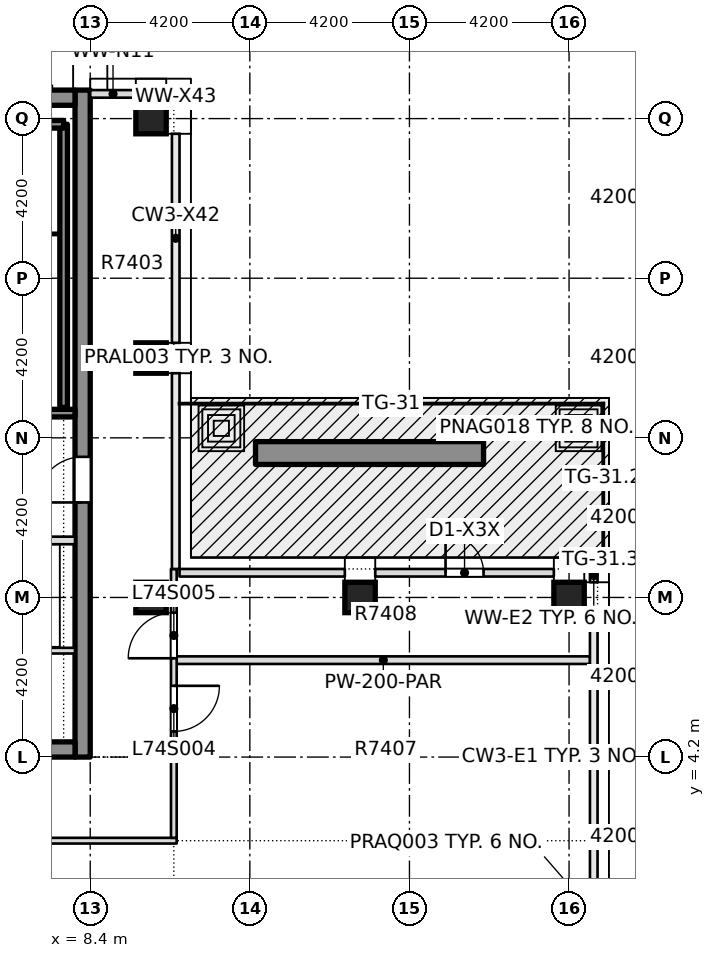
"""IFC4 building model, lengths in metres.
Left out: names, types, materials, properties, quantities, classifications, styles, units other than length and angle.
Written with IfcOpenShell. Run it as: python <this file> out.ifc"""

import sys

from ifc_helpers import new_model, si_unit, direction, frame, frame_2d, origin, origin_2d, place, context, subcontext, project, spatial, rectangle, extrude, element, fill, save


model = new_model("IFC4")
c1 = context("Model", 3, precision=1e-05, world=origin(), true_north=direction((0.0, 1.0)))
c2 = subcontext(c1, "Body", "Model", "MODEL_VIEW")
j1 = project(units=[si_unit("LENGTHUNIT", "METRE"), si_unit("PLANEANGLEUNIT", "RADIAN")], contexts=[c1])
p1 = place(None, origin())
s1 = spatial("IfcSite", under=j1, at=p1, CompositionType="ELEMENT")
p2 = place(p1, origin())
s2 = spatial("IfcBuilding", under=s1, at=p2, CompositionType="ELEMENT")
p3 = place(p2, frame((0.0, 0.0, 284.85)))
s3 = spatial("IfcBuildingStorey", under=s2, at=p3, CompositionType="ELEMENT", Elevation=284.85)
p4 = place(p3, frame((8.2, 4.2, -0.5), z_axis=(0.0, 0.0, 1.0), x_axis=(0.0, 1.0, 0.0)))
e1 = element("IfcWall", 1, at=p4, inside=s3, PredefinedType="SHEAR", context=c2, shape_type="SweptSolid", body=[
    extrude(rectangle(XDim=17.55, YDim=0.4, at=frame_2d((8.775, 0.0))), origin(), (0.0, 0.0, 1.0), 4.5),
])
p5 = place(p4, frame((6.7, 0.0, 0.5)))
e2 = element("IfcOpeningElement", 2, at=p5, cuts=e1, PredefinedType="OPENING", context=c2, shape_type="SweptSolid", body=[
    extrude(rectangle(XDim=1.2, YDim=2.1, at=frame_2d((0.6, 1.05))), frame((0.0, 0.21, 0.0), z_axis=(0.0, -1.0, 0.0), x_axis=(1.0, 0.0, 0.0)), (0.0, 0.0, 1.0), 0.42),
])
for number, where, z_axis, x_axis in (
    (3, (-8.0, 4.4, -0.5), (0.0, 0.0, 1.0), (1.0, 0.0, 0.0)),
    (4, (-8.0, 21.55, -0.5), (0.0, 0.0, 1.0), (1.0, 0.0, 0.0)),
):
    element("IfcWall", number, at=place(p3, frame(where, z_axis=z_axis, x_axis=x_axis)), inside=s3, PredefinedType="SHEAR", context=c2, shape_type="SweptSolid", body=[
        extrude(rectangle(XDim=16.0, YDim=0.4, at=frame_2d((8.0, 0.0))), origin(), (0.0, 0.0, 1.0), 4.5),
    ])
for number, where, z_axis, x_axis in (
    (5, (10.0, 8.4, -0.5), (0.0, 0.0, 1.0), (1.0, 0.0, 0.0)),
    (6, (15.5, 8.4, -0.5), (0.0, 0.0, 1.0), (1.0, 0.0, 0.0)),
    (7, (21.0, 8.4, -0.5), (0.0, 0.0, 1.0), (1.0, 0.0, 0.0)),
    (8, (10.0, 14.7, -0.5), (0.0, 0.0, 1.0), (1.0, 0.0, 0.0)),
    (9, (10.0, 21.0, -0.5), (0.0, 0.0, 1.0), (1.0, 0.0, 0.0)),
):
    element("IfcColumn", number, at=place(p3, frame(where, z_axis=z_axis, x_axis=x_axis)), inside=s3, PredefinedType="COLUMN", context=c2, shape_type="SweptSolid", body=[
        extrude(rectangle(XDim=0.8, YDim=0.8, at=origin_2d()), origin(), (0.0, 0.0, 1.0), 4.5),
    ])
p6 = place(p3, frame((-10.675, 2.0, 0.0), z_axis=(0.0, 0.0, 1.0), x_axis=(1.0, 0.0, 0.0)))
e10 = element("IfcWall", 10, at=p6, inside=s3, PredefinedType="PARTITIONING", context=c2, shape_type="SweptSolid", body=[
    extrude(rectangle(XDim=21.35, YDim=0.15, at=frame_2d((10.675, 0.0))), origin(), (0.0, 0.0, 1.0), 4.0),
])
p7 = place(p6, frame((9.925, 0.0, 0.0)))
e11 = element("IfcOpeningElement", 11, at=p7, cuts=e10, PredefinedType="OPENING", context=c2, shape_type="SweptSolid", body=[
    extrude(rectangle(XDim=1.5, YDim=2.1, at=frame_2d((0.75, 1.05))), frame((0.0, 0.085, 0.0), z_axis=(0.0, -1.0, 0.0), x_axis=(1.0, 0.0, 0.0)), (0.0, 0.0, 1.0), 0.17),
])
p8 = place(p3, frame((10.675, 6.75, 0.0), z_axis=(0.0, 0.0, 1.0), x_axis=(1.0, 0.0, 0.0)))
e12 = element("IfcWall", 12, at=p8, inside=s3, PredefinedType="PARTITIONING", context=c2, shape_type="SweptSolid", body=[
    extrude(rectangle(XDim=10.875, YDim=0.2, at=frame_2d((5.438, 0.0))), origin(), (0.0, 0.0, 1.0), 4.0),
])
p9 = place(p3, frame((10.6, 2.075, 0.0), z_axis=(0.0, 0.0, 1.0), x_axis=(0.0, 1.0, 0.0)))
e13 = element("IfcWall", 13, at=p9, inside=s3, PredefinedType="PARTITIONING", context=c2, shape_type="SweptSolid", body=[
    extrude(rectangle(XDim=7.075, YDim=0.15, at=frame_2d((3.538, 0.0))), origin(), (0.0, 0.0, 1.0), 4.0),
])
p10 = place(p9, frame((2.8, 0.0, 0.0)))
e14 = element("IfcOpeningElement", 14, at=p10, cuts=e13, PredefinedType="OPENING", context=c2, shape_type="SweptSolid", body=[
    extrude(rectangle(XDim=1.2, YDim=2.1, at=frame_2d((0.6, 1.05))), frame((0.0, 0.085, 0.0), z_axis=(0.0, -1.0, 0.0), x_axis=(1.0, 0.0, 0.0)), (0.0, 0.0, 1.0), 0.17),
])
p11 = place(p9, frame((4.725, 0.0, 0.0)))
e15 = element("IfcOpeningElement", 15, at=p11, cuts=e13, PredefinedType="OPENING", context=c2, shape_type="SweptSolid", body=[
    extrude(rectangle(XDim=1.2, YDim=2.1, at=frame_2d((0.6, 1.05))), frame((0.0, 0.085, 0.0), z_axis=(0.0, -1.0, 0.0), x_axis=(1.0, 0.0, 0.0)), (0.0, 0.0, 1.0), 0.17),
])
p12 = place(p3, frame((12.75, 12.2, 0.0), z_axis=(0.0, 0.0, 1.0), x_axis=(1.0, 0.0, 0.0)))
e16 = element("IfcWall", 16, at=p12, inside=s3, PredefinedType="USERDEFINED", context=c2, shape_type="SweptSolid", body=[
    extrude(rectangle(XDim=6.0, YDim=0.6, at=frame_2d((3.0, 0.0))), origin(), (0.0, 0.0, 1.0), 1.0),
])
p13 = place(p3, frame((21.65, 8.8, 0.0), z_axis=(0.0, 0.0, 1.0), x_axis=(0.0, 1.0, 0.0)))
e17 = element("IfcWall", 17, at=p13, inside=s3, PredefinedType="STANDARD", context=c2, shape_type="SweptSolid", body=[
    extrude(rectangle(XDim=0.35, YDim=0.2, at=frame_2d((0.175, 0.0))), origin(), (0.0, 0.0, 1.0), 4.0),
])
p14 = place(p3, frame((20.6, 9.05, 0.0), z_axis=(0.0, 0.0, 1.0), x_axis=(-1.0, 0.0, 0.0)))
e18 = element("IfcWall", 18, at=p14, inside=s3, PredefinedType="STANDARD", context=c2, shape_type="SweptSolid", body=[
    extrude(rectangle(XDim=4.7, YDim=0.2, at=frame_2d((2.35, 0.0))), origin(), (0.0, 0.0, 1.0), 4.0),
])
p15 = place(p14, frame((1.85, 0.0, 0.0)))
e19 = element("IfcOpeningElement", 19, at=p15, cuts=e18, PredefinedType="OPENING", context=c2, shape_type="SweptSolid", body=[
    extrude(rectangle(XDim=1.0, YDim=2.4, at=frame_2d((0.5, 1.2))), frame((0.0, 0.11, 0.0), z_axis=(0.0, -1.0, 0.0), x_axis=(1.0, 0.0, 0.0)), (0.0, 0.0, 1.0), 0.22),
])
p16 = place(p3, frame((15.1, 9.05, 0.0), z_axis=(0.0, 0.0, 1.0), x_axis=(-1.0, 0.0, 0.0)))
e20 = element("IfcWall", 20, at=p16, inside=s3, PredefinedType="STANDARD", context=c2, shape_type="SweptSolid", body=[
    extrude(rectangle(XDim=4.35, YDim=0.2, at=frame_2d((2.175, 0.0))), origin(), (0.0, 0.0, 1.0), 4.0),
])
p17 = place(p3, frame((10.65, 21.4, 0.0), z_axis=(0.0, 0.0, 1.0), x_axis=(0.0, 1.0, 0.0)))
e21 = element("IfcWall", 21, at=p17, inside=s3, PredefinedType="STANDARD", context=c2, shape_type="SweptSolid", body=[
    extrude(rectangle(XDim=0.35, YDim=0.2, at=frame_2d((0.175, 0.0))), origin(), (0.0, 0.0, 1.0), 4.0),
])
p18 = place(p3, frame((9.6, 21.65, 0.0), z_axis=(0.0, 0.0, 1.0), x_axis=(-1.0, 0.0, 0.0)))
e22 = element("IfcWall", 22, at=p18, inside=s3, PredefinedType="STANDARD", context=c2, shape_type="SweptSolid", body=[
    extrude(rectangle(XDim=1.2, YDim=0.2, at=frame_2d((0.6, 0.0))), origin(), (0.0, 0.0, 1.0), 4.0),
])
p19 = place(p3, frame((-7.999, 7.0, 0.0), z_axis=(0.0, 0.0, 1.0), x_axis=(1.0, 0.0, 0.0)))
e23 = element("IfcWall", 23, at=p19, inside=s3, PredefinedType="PARTITIONING", context=c2, shape_type="SweptSolid", body=[
    extrude(rectangle(XDim=15.998, YDim=0.15, at=frame_2d((7.999, 0.0))), origin(), (0.0, 0.0, 1.0), 4.0),
])
p20 = place(p19, frame((7.299, 0.0, 0.0)))
e24 = element("IfcOpeningElement", 24, at=p20, cuts=e23, PredefinedType="OPENING", context=c2, shape_type="SweptSolid", body=[
    extrude(rectangle(XDim=1.4, YDim=2.1, at=frame_2d((0.7, 1.05))), frame((0.0, 0.085, 0.0), z_axis=(0.0, -1.0, 0.0), x_axis=(1.0, 0.0, 0.0)), (0.0, 0.0, 1.0), 0.17),
])
p21 = place(p3, frame((3.6, 9.9, 0.0), z_axis=(0.0, 0.0, 1.0), x_axis=(1.0, 0.0, 0.0)))
e25 = element("IfcWall", 25, at=p21, inside=s3, PredefinedType="PARTITIONING", context=c2, shape_type="SweptSolid", body=[
    extrude(rectangle(XDim=4.399, YDim=0.2, at=frame_2d((2.199, 0.0))), origin(), (0.0, 0.0, 1.0), 4.0),
])
p22 = place(p21, frame((2.25, 0.0, 0.0)))
e26 = element("IfcOpeningElement", 26, at=p22, cuts=e25, PredefinedType="OPENING", context=c2, shape_type="SweptSolid", body=[
    extrude(rectangle(XDim=1.1, YDim=2.1, at=frame_2d((0.55, 1.05))), frame((0.0, 0.11, 0.0), z_axis=(0.0, -1.0, 0.0), x_axis=(1.0, 0.0, 0.0)), (0.0, 0.0, 1.0), 0.22),
])
p23 = place(p3, frame((3.425, 13.25, 0.0), z_axis=(0.0, 0.0, 1.0), x_axis=(1.0, 0.0, 0.0)))
e27 = element("IfcWall", 27, at=p23, inside=s3, PredefinedType="SOLIDWALL", context=c2, shape_type="SweptSolid", body=[
    extrude(rectangle(XDim=4.574, YDim=0.2, at=frame_2d((2.287, 0.0))), origin(), (0.0, 0.0, 1.0), 4.0),
])
p24 = place(p23, frame((1.825, 0.0, 0.0)))
e28 = element("IfcOpeningElement", 28, at=p24, cuts=e27, PredefinedType="OPENING", context=c2, shape_type="SweptSolid", body=[
    extrude(rectangle(XDim=1.2, YDim=2.1, at=frame_2d((0.6, 1.05))), frame((0.0, 0.11, 0.0), z_axis=(0.0, -1.0, 0.0), x_axis=(1.0, 0.0, 0.0)), (0.0, 0.0, 1.0), 0.22),
])
p25 = place(p3, frame((7.7, 13.4, 0.0), z_axis=(0.0, 0.0, 1.0), x_axis=(0.0, 1.0, 0.0)))
e29 = element("IfcWall", 29, at=p25, inside=s3, PredefinedType="SOLIDWALL", context=c2, shape_type="SweptSolid", body=[
    extrude(rectangle(XDim=7.45, YDim=0.2, at=frame_2d((3.725, 0.0))), origin(), (0.0, 0.0, 1.0), 4.0),
])
p26 = place(p3, frame((4.1, 20.85, 0.0), z_axis=(0.0, 0.0, 1.0), x_axis=(1.0, 0.0, 0.0)))
e30 = element("IfcWall", 30, at=p26, inside=s3, PredefinedType="SOLIDWALL", context=c2, shape_type="SweptSolid", body=[
    extrude(rectangle(XDim=3.6, YDim=0.2, at=frame_2d((1.8, 0.0))), origin(), (0.0, 0.0, 1.0), 4.0),
])
p27 = place(p10, origin())
e31 = element("IfcDoor", 31, at=p27, inside=s3, OperationType="SINGLE_SWING_LEFT", PredefinedType="DOOR", context=c2, shape_type="SweptSolid", body=[
    extrude(rectangle(XDim=1.2, YDim=2.1, at=frame_2d((0.6, 1.05))), frame((0.0, 0.025, 0.0), z_axis=(0.0, -1.0, 0.0), x_axis=(1.0, 0.0, 0.0)), (0.0, 0.0, 1.0), 0.05),
])
fill(e14, e31)
p28 = place(p11, origin())
e32 = element("IfcDoor", 32, at=p28, inside=s3, OperationType="SINGLE_SWING_RIGHT", PredefinedType="DOOR", context=c2, shape_type="SweptSolid", body=[
    extrude(rectangle(XDim=1.2, YDim=2.1, at=frame_2d((0.6, 1.05))), frame((0.0, 0.025, 0.0), z_axis=(0.0, -1.0, 0.0), x_axis=(1.0, 0.0, 0.0)), (0.0, 0.0, 1.0), 0.05),
])
fill(e15, e32)
p29 = place(p15, origin())
e33 = element("IfcDoor", 33, at=p29, inside=s3, OperationType="SINGLE_SWING_LEFT", PredefinedType="DOOR", context=c2, shape_type="SweptSolid", body=[
    extrude(rectangle(XDim=1.0, YDim=2.4, at=frame_2d((0.5, 1.2))), frame((0.0, 0.025, 0.0), z_axis=(0.0, -1.0, 0.0), x_axis=(1.0, 0.0, 0.0)), (0.0, 0.0, 1.0), 0.05),
])
fill(e19, e33)
p30 = place(p5, origin())
e34 = element("IfcDoor", 34, at=p30, inside=s3, OperationType="SINGLE_SWING_LEFT", PredefinedType="DOOR", context=c2, shape_type="SweptSolid", body=[
    extrude(rectangle(XDim=1.2, YDim=2.1, at=frame_2d((0.6, 1.05))), frame((0.0, 0.025, 0.0), z_axis=(0.0, -1.0, 0.0), x_axis=(1.0, 0.0, 0.0)), (0.0, 0.0, 1.0), 0.05),
])
fill(e2, e34)
save(model, sys.argv[1])
